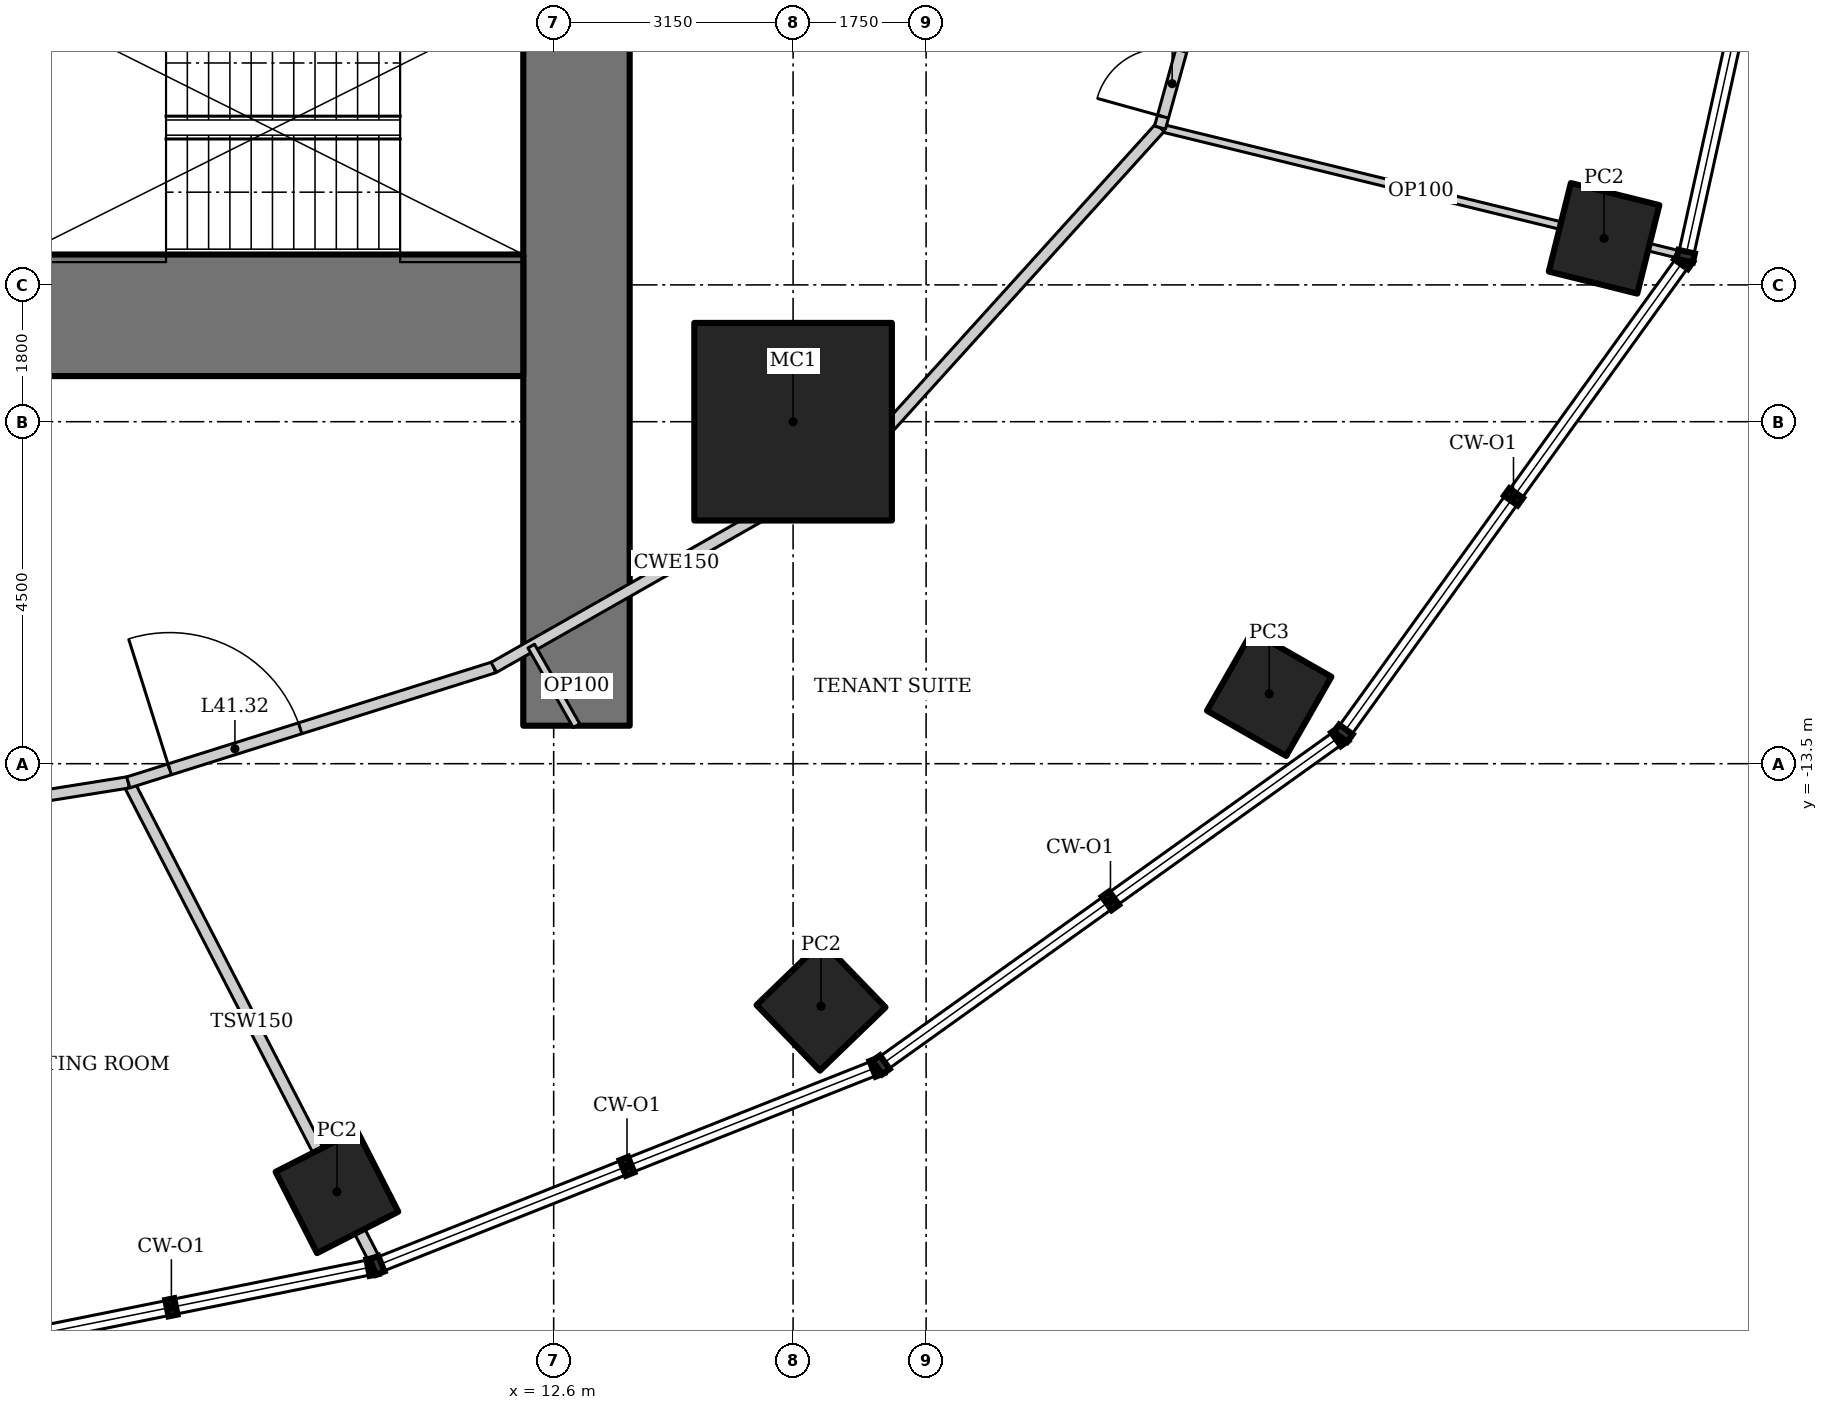
"""IFC4 building model, lengths in metres.
Left out: names, types, materials, properties, quantities, classifications, styles, units other than length and angle.
Written with IfcOpenShell. Run it as: python <this file> out.ifc"""

import sys

from ifc_helpers import new_model, si_unit, direction, frame, frame_2d, origin, origin_2d, place, context, subcontext, project, spatial, rectangle, hollow_rectangle, extrude, element, fill, save


model = new_model("IFC4")
c1 = context("Model", 3, precision=1e-05, world=origin(), true_north=direction((0.0, 1.0)))
c2 = subcontext(c1, "Body", "Model", "MODEL_VIEW")
j1 = project(units=[si_unit("LENGTHUNIT", "METRE"), si_unit("PLANEANGLEUNIT", "RADIAN")], contexts=[c1])
p1 = place(None, origin())
s1 = spatial("IfcSite", under=j1, at=p1, CompositionType="ELEMENT")
p2 = place(p1, origin())
s2 = spatial("IfcBuilding", under=s1, at=p2, CompositionType="ELEMENT")
p3 = place(p2, frame((0.0, 0.0, 176.2)))
s3 = spatial("IfcBuildingStorey", under=s2, at=p3, CompositionType="ELEMENT", Elevation=176.2)
p4 = place(p3, frame((15.75, -9.0, 0.0), z_axis=(0.0, 0.0, 1.0), x_axis=(1.0, 0.0, 0.0)))
e1 = element("IfcColumn", 1, at=p4, inside=s3, PredefinedType="COLUMN", context=c2, shape_type="SweptSolid", body=[
    extrude(hollow_rectangle(XDim=2.6, YDim=2.6, WallThickness=0.13, at=origin_2d()), origin(), (0.0, 0.0, 1.0), 4.2),
])
for number, where, z_axis, x_axis in (
    (2, (9.749, -19.133, 0.0), (0.0, 0.0, 1.0), (0.891, 0.454, 0.0)),
    (3, (16.118, -16.69, 0.0), (0.0, 0.0, 1.0), (0.719, 0.695, 0.0)),
):
    element("IfcColumn", number, at=place(p3, frame(where, z_axis=z_axis, x_axis=x_axis)), inside=s3, PredefinedType="COLUMN", context=c2, shape_type="SweptSolid", body=[
        extrude(hollow_rectangle(XDim=1.2, YDim=1.2, WallThickness=0.1, at=origin_2d()), origin(), (0.0, 0.0, 1.0), 4.2),
    ])
p5 = place(p3, frame((22.014, -12.579, 0.0), z_axis=(0.0, 0.0, 1.0), x_axis=(0.496139221777, 0.86824298017, 0.0)))
e4 = element("IfcColumn", 4, at=p5, inside=s3, PredefinedType="COLUMN", context=c2, shape_type="SweptSolid", body=[
    extrude(hollow_rectangle(XDim=1.2, YDim=1.2, WallThickness=0.12, at=origin_2d()), origin(), (0.0, 0.0, 1.0), 4.2),
])
p6 = place(p3, frame((26.42, -6.587, 0.0), z_axis=(0.0, 0.0, 1.0), x_axis=(0.2419218956, 0.970295726276, 0.0)))
e5 = element("IfcColumn", 5, at=p6, inside=s3, PredefinedType="COLUMN", context=c2, shape_type="SweptSolid", body=[
    extrude(hollow_rectangle(XDim=1.2, YDim=1.2, WallThickness=0.1, at=origin_2d()), origin(), (0.0, 0.0, 1.0), 4.2),
])
p7 = place(p3, frame((12.9, -13.0, 0.0), z_axis=(0.0, 0.0, 1.0), x_axis=(0.0, 1.0, 0.0)))
e6 = element("IfcWall", 6, at=p7, inside=s3, PredefinedType="SHEAR", context=c2, shape_type="SweptSolid", body=[
    extrude(rectangle(XDim=26.0, YDim=1.4, at=frame_2d((13.0, 0.0))), origin(), (0.0, 0.0, 1.0), 4.2),
])
p8 = place(p7, frame((12.1, 0.0, 0.0)))
e7 = element("IfcOpeningElement", 7, at=p8, cuts=e6, PredefinedType="OPENING", context=c2, shape_type="SweptSolid", body=[
    extrude(rectangle(XDim=1.8, YDim=2.1, at=frame_2d((0.9, 1.05))), frame((0.0, 0.71, 0.0), z_axis=(0.0, -1.0, 0.0), x_axis=(1.0, 0.0, 0.0)), (0.0, 0.0, 1.0), 1.42),
])
p9 = place(p3, frame((-12.2, -7.6, 0.0), z_axis=(0.0, 0.0, 1.0), x_axis=(1.0, 0.0, 0.0)))
e8 = element("IfcWall", 8, at=p9, inside=s3, PredefinedType="SHEAR", context=c2, shape_type="SweptSolid", body=[
    extrude(rectangle(XDim=24.4, YDim=1.6, at=frame_2d((12.2, 0.0))), origin(), (0.0, 0.0, 1.0), 4.2),
])
p10 = place(p3, frame((10.253, -20.052, 0.0), z_axis=(0.0, 0.0, 1.0), x_axis=(-0.458082677592, 0.888909590729, 0.0)))
e9 = element("IfcWall", 9, at=p10, inside=s3, PredefinedType="PARTITIONING", context=c2, shape_type="SweptSolid", body=[
    extrude(rectangle(XDim=7.094, YDim=0.15, at=frame_2d((3.547, 0.0))), origin(), (0.0, 0.0, 1.0), 3.349),
])
p11 = place(p3, frame((27.441, -6.809, 0.0), z_axis=(0.0, 0.0, 1.0), x_axis=(-0.971377572955, 0.237540755996, 0.0)))
e10 = element("IfcWall", 10, at=p11, inside=s3, PredefinedType="PARTITIONING", context=c2, shape_type="SweptSolid", body=[
    extrude(rectangle(XDim=7.066, YDim=0.1, at=frame_2d((3.533, 0.0))), origin(), (0.0, 0.0, 1.0), 3.113),
])
p12 = place(p3, frame((3.31, -14.335, 0.0), z_axis=(0.0, 0.0, 1.0), x_axis=(0.987511396594, 0.157547585181, 0.0)))
e11 = element("IfcWall", 11, at=p12, inside=s3, PredefinedType="PARTITIONING", context=c2, shape_type="SweptSolid", body=[
    extrude(rectangle(XDim=3.741, YDim=0.15, at=frame_2d((1.87, 0.0))), origin(), (0.0, 0.0, 1.0), 4.05),
])
p13 = place(p12, frame((0.15, 0.0, 0.0)))
e12 = element("IfcOpeningElement", 12, at=p13, cuts=e11, PredefinedType="OPENING", context=c2, shape_type="SweptSolid", body=[
    extrude(rectangle(XDim=0.9, YDim=2.1, at=frame_2d((0.45, 1.05))), frame((0.0, 0.085, 0.0), z_axis=(0.0, -1.0, 0.0), x_axis=(1.0, 0.0, 0.0)), (0.0, 0.0, 1.0), 0.17),
])
p14 = place(p3, frame((7.004, -13.746, 0.0), z_axis=(0.0, 0.0, 1.0), x_axis=(0.953893934057, 0.300143903101, 0.0)))
e13 = element("IfcWall", 13, at=p14, inside=s3, PredefinedType="PARTITIONING", context=c2, shape_type="SweptSolid", body=[
    extrude(rectangle(XDim=5.042, YDim=0.15, at=frame_2d((2.521, 0.0))), origin(), (0.0, 0.0, 1.0), 4.05),
])
p15 = place(p14, frame((0.57, 0.0, 0.0)))
e14 = element("IfcOpeningElement", 14, at=p15, cuts=e13, PredefinedType="OPENING", context=c2, shape_type="SweptSolid", body=[
    extrude(rectangle(XDim=1.8, YDim=2.1, at=frame_2d((0.9, 1.05))), frame((0.0, 0.085, 0.0), z_axis=(0.0, -1.0, 0.0), x_axis=(1.0, 0.0, 0.0)), (0.0, 0.0, 1.0), 0.17),
])
p16 = place(p3, frame((11.813, -12.232, 0.0), z_axis=(0.0, 0.0, 1.0), x_axis=(0.869375991036, 0.494151177485, 0.0)))
e15 = element("IfcWall", 15, at=p16, inside=s3, PredefinedType="PARTITIONING", context=c2, shape_type="SweptSolid", body=[
    extrude(rectangle(XDim=5.532, YDim=0.15, at=frame_2d((2.766, 0.0))), origin(), (0.0, 0.0, 1.0), 4.05),
])
p17 = place(p3, frame((16.623, -9.499, 0.0), z_axis=(0.0, 0.0, 1.0), x_axis=(0.671118353743, 0.741350224435, 0.0)))
e16 = element("IfcWall", 16, at=p17, inside=s3, PredefinedType="PARTITIONING", context=c2, shape_type="SweptSolid", body=[
    extrude(rectangle(XDim=5.892, YDim=0.15, at=frame_2d((2.946, 0.0))), origin(), (0.0, 0.0, 1.0), 4.05),
])
p18 = place(p3, frame((20.577, -5.13, 0.0), z_axis=(0.0, 0.0, 1.0), x_axis=(0.267293817428, 0.963615076244, 0.0)))
e17 = element("IfcWall", 17, at=p18, inside=s3, PredefinedType="PARTITIONING", context=c2, shape_type="SweptSolid", body=[
    extrude(rectangle(XDim=5.324, YDim=0.15, at=frame_2d((2.662, 0.0))), origin(), (0.0, 0.0, 1.0), 4.05),
])
p19 = place(p18, frame((0.15, 0.0, 0.0)))
e18 = element("IfcOpeningElement", 18, at=p19, cuts=e17, PredefinedType="OPENING", context=c2, shape_type="SweptSolid", body=[
    extrude(rectangle(XDim=0.9, YDim=2.1, at=frame_2d((0.45, 1.05))), frame((0.0, 0.085, 0.0), z_axis=(0.0, -1.0, 0.0), x_axis=(1.0, 0.0, 0.0)), (0.0, 0.0, 1.0), 0.17),
])
p20 = place(p3, frame((12.9, -13.0, 0.0), z_axis=(0.0, 0.0, 1.0), x_axis=(-0.494173075358, 0.869363543974, 0.0)))
e19 = element("IfcWall", 19, at=p20, inside=s3, PredefinedType="PARTITIONING", context=c2, shape_type="SweptSolid", body=[
    extrude(rectangle(XDim=1.204, YDim=0.1, at=frame_2d((0.602, 0.0))), origin(), (0.0, 0.0, 1.0), 4.05),
])
p21 = place(p15, origin())
e20 = element("IfcDoor", 20, at=p21, inside=s3, OperationType="DOUBLE_DOOR_DOUBLE_SWING", PredefinedType="DOOR", context=c2, shape_type="SweptSolid", body=[
    extrude(rectangle(XDim=1.8, YDim=2.1, at=frame_2d((0.9, 1.05))), frame((0.0, 0.025, 0.0), z_axis=(0.0, -1.0, 0.0), x_axis=(1.0, 0.0, 0.0)), (0.0, 0.0, 1.0), 0.05),
])
fill(e14, e20)
p22 = place(p19, origin())
e21 = element("IfcDoor", 21, at=p22, inside=s3, OperationType="SINGLE_SWING_LEFT", PredefinedType="DOOR", context=c2, shape_type="SweptSolid", body=[
    extrude(rectangle(XDim=0.9, YDim=2.1, at=frame_2d((0.45, 1.05))), frame((0.0, 0.025, 0.0), z_axis=(0.0, -1.0, 0.0), x_axis=(1.0, 0.0, 0.0)), (0.0, 0.0, 1.0), 0.05),
])
fill(e18, e21)
save(model, sys.argv[1])
